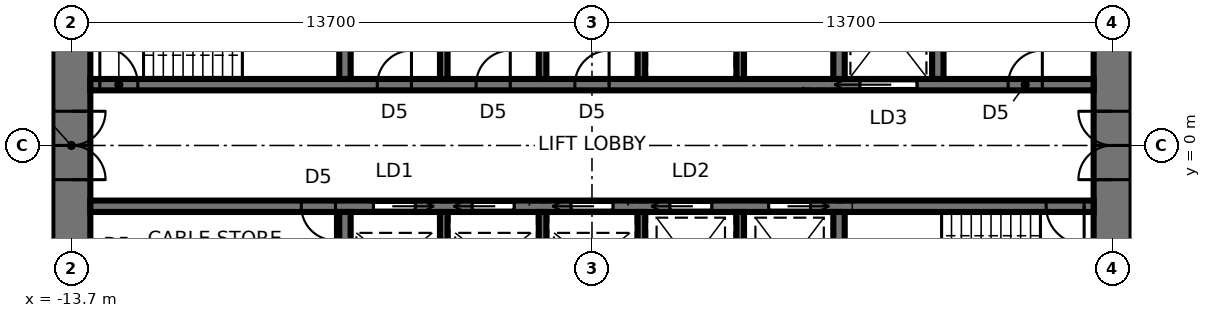
"""IFC4 building model, lengths in metres.
Left out: names, types, materials, properties, quantities, classifications, styles, units other than length and angle.
Written with IfcOpenShell. Run it as: python <this file> out.ifc"""

import sys

from ifc_helpers import new_model, si_unit, direction, frame, frame_2d, origin, place, context, subcontext, project, spatial, rectangle, extrude, element, fill, save


model = new_model("IFC4")
c1 = context("Model", 3, precision=1e-05, world=origin(), true_north=direction((0.0, 1.0)))
c2 = subcontext(c1, "Body", "Model", "MODEL_VIEW")
j1 = project(units=[si_unit("LENGTHUNIT", "METRE"), si_unit("PLANEANGLEUNIT", "RADIAN")], contexts=[c1])
p1 = place(None, origin())
s1 = spatial("IfcSite", under=j1, at=p1, CompositionType="ELEMENT")
p2 = place(p1, origin())
s2 = spatial("IfcBuilding", under=s1, at=p2, CompositionType="ELEMENT")
p3 = place(p2, frame((0.0, 0.0, 147.0)))
s3 = spatial("IfcBuildingStorey", under=s2, at=p3, CompositionType="ELEMENT", Elevation=147.0)
p4 = place(p3, frame((13.7, -9.5, 0.0), z_axis=(0.0, 0.0, 1.0), x_axis=(0.0, 1.0, 0.0)))
e1 = element("IfcWall", 1, at=p4, inside=s3, PredefinedType="SHEAR", context=c2, shape_type="SweptSolid", body=[
    extrude(rectangle(XDim=19.0, YDim=1.0, at=frame_2d((9.5, 0.0))), origin(), (0.0, 0.0, 1.0), 3.9),
])
p5 = place(p4, frame((8.6, 0.0, 0.0)))
e2 = element("IfcOpeningElement", 2, at=p5, cuts=e1, PredefinedType="OPENING", context=c2, shape_type="SweptSolid", body=[
    extrude(rectangle(XDim=1.8, YDim=2.4, at=frame_2d((0.9, 1.2))), frame((0.0, 0.51, 0.0), z_axis=(0.0, -1.0, 0.0), x_axis=(1.0, 0.0, 0.0)), (0.0, 0.0, 1.0), 1.02),
])
p6 = place(p3, frame((-13.7, 9.5, 0.0), z_axis=(0.0, 0.0, 1.0), x_axis=(0.0, -1.0, 0.0)))
e3 = element("IfcWall", 3, at=p6, inside=s3, PredefinedType="SHEAR", context=c2, shape_type="SweptSolid", body=[
    extrude(rectangle(XDim=19.0, YDim=1.0, at=frame_2d((9.5, 0.0))), origin(), (0.0, 0.0, 1.0), 3.9),
])
p7 = place(p6, frame((8.6, 0.0, 0.0)))
e4 = element("IfcOpeningElement", 4, at=p7, cuts=e3, PredefinedType="OPENING", context=c2, shape_type="SweptSolid", body=[
    extrude(rectangle(XDim=1.8, YDim=2.4, at=frame_2d((0.9, 1.2))), frame((0.0, 0.51, 0.0), z_axis=(0.0, -1.0, 0.0), x_axis=(1.0, 0.0, 0.0)), (0.0, 0.0, 1.0), 1.02),
])
p8 = place(p3, frame((-13.2, 1.6, 0.0), z_axis=(0.0, 0.0, 1.0), x_axis=(1.0, 0.0, 0.0)))
e5 = element("IfcWall", 5, at=p8, inside=s3, PredefinedType="SHEAR", context=c2, shape_type="SweptSolid", body=[
    extrude(rectangle(XDim=26.4, YDim=0.3, at=frame_2d((13.2, 0.0))), origin(), (0.0, 0.0, 1.0), 3.9),
])
p9 = place(p8, frame((0.25, 0.0, 0.0)))
e6 = element("IfcOpeningElement", 6, at=p9, cuts=e5, PredefinedType="OPENING", context=c2, shape_type="SweptSolid", body=[
    extrude(rectangle(XDim=1.0, YDim=2.1, at=frame_2d((0.5, 1.05))), frame((0.0, 0.16, 0.0), z_axis=(0.0, -1.0, 0.0), x_axis=(1.0, 0.0, 0.0)), (0.0, 0.0, 1.0), 0.32),
])
p10 = place(p8, frame((20.25, 0.0, 0.0)))
e7 = element("IfcOpeningElement", 7, at=p10, cuts=e5, PredefinedType="OPENING", context=c2, shape_type="SweptSolid", body=[
    extrude(rectangle(XDim=1.5, YDim=2.4, at=frame_2d((0.75, 1.2))), frame((0.0, 0.16, 0.0), z_axis=(0.0, -1.0, 0.0), x_axis=(1.0, 0.0, 0.0)), (0.0, 0.0, 1.0), 0.32),
])
p11 = place(p8, frame((7.55, 0.0, 0.0)))
e8 = element("IfcOpeningElement", 8, at=p11, cuts=e5, PredefinedType="OPENING", context=c2, shape_type="SweptSolid", body=[
    extrude(rectangle(XDim=0.9, YDim=2.1, at=frame_2d((0.45, 1.05))), frame((0.0, 0.16, 0.0), z_axis=(0.0, -1.0, 0.0), x_axis=(1.0, 0.0, 0.0)), (0.0, 0.0, 1.0), 0.32),
])
p12 = place(p8, frame((10.15, 0.0, 0.0)))
e9 = element("IfcOpeningElement", 9, at=p12, cuts=e5, PredefinedType="OPENING", context=c2, shape_type="SweptSolid", body=[
    extrude(rectangle(XDim=0.9, YDim=2.1, at=frame_2d((0.45, 1.05))), frame((0.0, 0.16, 0.0), z_axis=(0.0, -1.0, 0.0), x_axis=(1.0, 0.0, 0.0)), (0.0, 0.0, 1.0), 0.32),
])
p13 = place(p8, frame((12.75, 0.0, 0.0)))
e10 = element("IfcOpeningElement", 10, at=p13, cuts=e5, PredefinedType="OPENING", context=c2, shape_type="SweptSolid", body=[
    extrude(rectangle(XDim=0.9, YDim=2.1, at=frame_2d((0.45, 1.05))), frame((0.0, 0.16, 0.0), z_axis=(0.0, -1.0, 0.0), x_axis=(1.0, 0.0, 0.0)), (0.0, 0.0, 1.0), 0.32),
])
p14 = place(p8, frame((24.15, 0.0, 0.0)))
e11 = element("IfcOpeningElement", 11, at=p14, cuts=e5, PredefinedType="OPENING", context=c2, shape_type="SweptSolid", body=[
    extrude(rectangle(XDim=0.9, YDim=2.1, at=frame_2d((0.45, 1.05))), frame((0.0, 0.16, 0.0), z_axis=(0.0, -1.0, 0.0), x_axis=(1.0, 0.0, 0.0)), (0.0, 0.0, 1.0), 0.32),
])
p15 = place(p3, frame((-13.2, -1.6, 0.0), z_axis=(0.0, 0.0, 1.0), x_axis=(1.0, 0.0, 0.0)))
e12 = element("IfcWall", 12, at=p15, inside=s3, PredefinedType="SHEAR", context=c2, shape_type="SweptSolid", body=[
    extrude(rectangle(XDim=26.4, YDim=0.3, at=frame_2d((13.2, 0.0))), origin(), (0.0, 0.0, 1.0), 3.9),
])
p16 = place(p15, frame((25.15, 0.0, 0.0)))
e13 = element("IfcOpeningElement", 13, at=p16, cuts=e12, PredefinedType="OPENING", context=c2, shape_type="SweptSolid", body=[
    extrude(rectangle(XDim=1.0, YDim=2.1, at=frame_2d((0.5, 1.05))), frame((0.0, 0.16, 0.0), z_axis=(0.0, -1.0, 0.0), x_axis=(1.0, 0.0, 0.0)), (0.0, 0.0, 1.0), 0.32),
])
p17 = place(p15, frame((7.45, 0.0, 0.0)))
e14 = element("IfcOpeningElement", 14, at=p17, cuts=e12, PredefinedType="OPENING", context=c2, shape_type="SweptSolid", body=[
    extrude(rectangle(XDim=1.1, YDim=2.3, at=frame_2d((0.55, 1.15))), frame((0.0, 0.16, 0.0), z_axis=(0.0, -1.0, 0.0), x_axis=(1.0, 0.0, 0.0)), (0.0, 0.0, 1.0), 0.32),
])
p18 = place(p15, frame((10.05, 0.0, 0.0)))
e15 = element("IfcOpeningElement", 15, at=p18, cuts=e12, PredefinedType="OPENING", context=c2, shape_type="SweptSolid", body=[
    extrude(rectangle(XDim=1.1, YDim=2.3, at=frame_2d((0.55, 1.15))), frame((0.0, 0.16, 0.0), z_axis=(0.0, -1.0, 0.0), x_axis=(1.0, 0.0, 0.0)), (0.0, 0.0, 1.0), 0.32),
])
p19 = place(p15, frame((12.65, 0.0, 0.0)))
e16 = element("IfcOpeningElement", 16, at=p19, cuts=e12, PredefinedType="OPENING", context=c2, shape_type="SweptSolid", body=[
    extrude(rectangle(XDim=1.1, YDim=2.3, at=frame_2d((0.55, 1.15))), frame((0.0, 0.16, 0.0), z_axis=(0.0, -1.0, 0.0), x_axis=(1.0, 0.0, 0.0)), (0.0, 0.0, 1.0), 0.32),
])
p20 = place(p15, frame((15.25, 0.0, 0.0)))
e17 = element("IfcOpeningElement", 17, at=p20, cuts=e12, PredefinedType="OPENING", context=c2, shape_type="SweptSolid", body=[
    extrude(rectangle(XDim=1.1, YDim=2.3, at=frame_2d((0.55, 1.15))), frame((0.0, 0.16, 0.0), z_axis=(0.0, -1.0, 0.0), x_axis=(1.0, 0.0, 0.0)), (0.0, 0.0, 1.0), 0.32),
])
p21 = place(p15, frame((17.85, 0.0, 0.0)))
e18 = element("IfcOpeningElement", 18, at=p21, cuts=e12, PredefinedType="OPENING", context=c2, shape_type="SweptSolid", body=[
    extrude(rectangle(XDim=1.1, YDim=2.3, at=frame_2d((0.55, 1.15))), frame((0.0, 0.16, 0.0), z_axis=(0.0, -1.0, 0.0), x_axis=(1.0, 0.0, 0.0)), (0.0, 0.0, 1.0), 0.32),
])
p22 = place(p15, frame((5.55, 0.0, 0.0)))
e19 = element("IfcOpeningElement", 19, at=p22, cuts=e12, PredefinedType="OPENING", context=c2, shape_type="SweptSolid", body=[
    extrude(rectangle(XDim=0.9, YDim=2.1, at=frame_2d((0.45, 1.05))), frame((0.0, 0.16, 0.0), z_axis=(0.0, -1.0, 0.0), x_axis=(1.0, 0.0, 0.0)), (0.0, 0.0, 1.0), 0.32),
])
for number, where, z_axis, x_axis in (
    (20, (-6.5, 1.75, 0.0), (0.0, 0.0, 1.0), (0.0, 1.0, 0.0)),
    (21, (6.5, 1.75, 0.0), (0.0, 0.0, 1.0), (0.0, 1.0, 0.0)),
):
    element("IfcWall", number, at=place(p3, frame(where, z_axis=z_axis, x_axis=x_axis)), inside=s3, PredefinedType="SHEAR", context=c2, shape_type="SweptSolid", body=[
        extrude(rectangle(XDim=2.7, YDim=0.3, at=frame_2d((1.35, 0.0))), origin(), (0.0, 0.0, 1.0), 3.9),
    ])
for number, where, z_axis, x_axis in (
    (22, (-3.9, 1.75, 0.0), (0.0, 0.0, 1.0), (0.0, 1.0, 0.0)),
    (23, (-1.3, 1.75, 0.0), (0.0, 0.0, 1.0), (0.0, 1.0, 0.0)),
    (24, (1.3, 1.75, 0.0), (0.0, 0.0, 1.0), (0.0, 1.0, 0.0)),
    (25, (3.9, 1.75, 0.0), (0.0, 0.0, 1.0), (0.0, 1.0, 0.0)),
):
    element("IfcWall", number, at=place(p3, frame(where, z_axis=z_axis, x_axis=x_axis)), inside=s3, PredefinedType="SHEAR", context=c2, shape_type="SweptSolid", body=[
        extrude(rectangle(XDim=2.7, YDim=0.2, at=frame_2d((1.35, 0.0))), origin(), (0.0, 0.0, 1.0), 3.9),
    ])
for number, where, z_axis, x_axis in (
    (26, (-6.5, -1.75, 0.0), (0.0, 0.0, 1.0), (0.0, -1.0, 0.0)),
    (27, (6.5, -1.75, 0.0), (0.0, 0.0, 1.0), (0.0, -1.0, 0.0)),
):
    element("IfcWall", number, at=place(p3, frame(where, z_axis=z_axis, x_axis=x_axis)), inside=s3, PredefinedType="SHEAR", context=c2, shape_type="SweptSolid", body=[
        extrude(rectangle(XDim=2.7, YDim=0.3, at=frame_2d((1.35, 0.0))), origin(), (0.0, 0.0, 1.0), 3.9),
    ])
for number, where, z_axis, x_axis in (
    (28, (-3.9, -1.75, 0.0), (0.0, 0.0, 1.0), (0.0, -1.0, 0.0)),
    (29, (-1.3, -1.75, 0.0), (0.0, 0.0, 1.0), (0.0, -1.0, 0.0)),
    (30, (1.3, -1.75, 0.0), (0.0, 0.0, 1.0), (0.0, -1.0, 0.0)),
    (31, (3.9, -1.75, 0.0), (0.0, 0.0, 1.0), (0.0, -1.0, 0.0)),
):
    element("IfcWall", number, at=place(p3, frame(where, z_axis=z_axis, x_axis=x_axis)), inside=s3, PredefinedType="SHEAR", context=c2, shape_type="SweptSolid", body=[
        extrude(rectangle(XDim=2.7, YDim=0.2, at=frame_2d((1.35, 0.0))), origin(), (0.0, 0.0, 1.0), 3.9),
    ])
p23 = place(p3, frame((9.1, 1.75, 0.0), z_axis=(0.0, 0.0, 1.0), x_axis=(0.0, 1.0, 0.0)))
e32 = element("IfcWall", 32, at=p23, inside=s3, PredefinedType="SHEAR", context=c2, shape_type="SweptSolid", body=[
    extrude(rectangle(XDim=2.7, YDim=0.3, at=frame_2d((1.35, 0.0))), origin(), (0.0, 0.0, 1.0), 3.9),
])
p24 = place(p7, origin())
e33 = element("IfcDoor", 33, at=p24, inside=s3, OperationType="DOUBLE_DOOR_SINGLE_SWING", PredefinedType="DOOR", context=c2, shape_type="SweptSolid", body=[
    extrude(rectangle(XDim=1.72, YDim=2.36, at=frame_2d((0.9, 1.18))), frame((0.0, 0.025, 0.0), z_axis=(0.0, -1.0, 0.0), x_axis=(1.0, 0.0, 0.0)), (0.0, 0.0, 1.0), 0.05),
    extrude(rectangle(XDim=0.04, YDim=2.4, at=frame_2d((0.02, 1.2))), frame((0.0, 0.25, 0.0), z_axis=(0.0, -1.0, 0.0), x_axis=(1.0, 0.0, 0.0)), (0.0, 0.0, 1.0), 0.5),
    extrude(rectangle(XDim=0.04, YDim=2.4, at=frame_2d((1.78, 1.2))), frame((0.0, 0.25, 0.0), z_axis=(0.0, -1.0, 0.0), x_axis=(1.0, 0.0, 0.0)), (0.0, 0.0, 1.0), 0.5),
    extrude(rectangle(XDim=1.72, YDim=0.04, at=frame_2d((0.9, 2.38))), frame((0.0, 0.25, 0.0), z_axis=(0.0, -1.0, 0.0), x_axis=(1.0, 0.0, 0.0)), (0.0, 0.0, 1.0), 0.5),
])
fill(e4, e33)
p25 = place(p5, origin())
e34 = element("IfcDoor", 34, at=p25, inside=s3, OperationType="DOUBLE_DOOR_SINGLE_SWING", PredefinedType="DOOR", context=c2, shape_type="SweptSolid", body=[
    extrude(rectangle(XDim=1.72, YDim=2.36, at=frame_2d((0.9, 1.18))), frame((0.0, 0.025, 0.0), z_axis=(0.0, -1.0, 0.0), x_axis=(1.0, 0.0, 0.0)), (0.0, 0.0, 1.0), 0.05),
    extrude(rectangle(XDim=0.04, YDim=2.4, at=frame_2d((0.02, 1.2))), frame((0.0, 0.25, 0.0), z_axis=(0.0, -1.0, 0.0), x_axis=(1.0, 0.0, 0.0)), (0.0, 0.0, 1.0), 0.5),
    extrude(rectangle(XDim=0.04, YDim=2.4, at=frame_2d((1.78, 1.2))), frame((0.0, 0.25, 0.0), z_axis=(0.0, -1.0, 0.0), x_axis=(1.0, 0.0, 0.0)), (0.0, 0.0, 1.0), 0.5),
    extrude(rectangle(XDim=1.72, YDim=0.04, at=frame_2d((0.9, 2.38))), frame((0.0, 0.25, 0.0), z_axis=(0.0, -1.0, 0.0), x_axis=(1.0, 0.0, 0.0)), (0.0, 0.0, 1.0), 0.5),
])
fill(e2, e34)
p26 = place(p9, origin())
e35 = element("IfcDoor", 35, at=p26, inside=s3, OperationType="SINGLE_SWING_LEFT", PredefinedType="DOOR", context=c2, shape_type="SweptSolid", body=[
    extrude(rectangle(XDim=1.0, YDim=2.1, at=frame_2d((0.5, 1.05))), frame((0.0, 0.025, 0.0), z_axis=(0.0, -1.0, 0.0), x_axis=(1.0, 0.0, 0.0)), (0.0, 0.0, 1.0), 0.05),
])
fill(e6, e35)
p27 = place(p16, frame((1.0, 0.0, 0.0), z_axis=(0.0, 0.0, 1.0), x_axis=(-1.0, 0.0, 0.0)))
e36 = element("IfcDoor", 36, at=p27, inside=s3, OperationType="SINGLE_SWING_LEFT", PredefinedType="DOOR", context=c2, shape_type="SweptSolid", body=[
    extrude(rectangle(XDim=1.0, YDim=2.1, at=frame_2d((0.5, 1.05))), frame((0.0, 0.025, 0.0), z_axis=(0.0, -1.0, 0.0), x_axis=(1.0, 0.0, 0.0)), (0.0, 0.0, 1.0), 0.05),
])
fill(e13, e36)
p28 = place(p10, origin())
e37 = element("IfcDoor", 37, at=p28, inside=s3, OperationType="SLIDING_TO_LEFT", PredefinedType="DOOR", context=c2, shape_type="SweptSolid", body=[
    extrude(rectangle(XDim=1.5, YDim=2.4, at=frame_2d((0.75, 1.2))), frame((0.0, 0.025, 0.0), z_axis=(0.0, -1.0, 0.0), x_axis=(1.0, 0.0, 0.0)), (0.0, 0.0, 1.0), 0.05),
])
fill(e7, e37)
p29 = place(p11, origin())
e38 = element("IfcDoor", 38, at=p29, inside=s3, OperationType="SINGLE_SWING_RIGHT", PredefinedType="DOOR", context=c2, shape_type="SweptSolid", body=[
    extrude(rectangle(XDim=0.9, YDim=2.1, at=frame_2d((0.45, 1.05))), frame((0.0, 0.025, 0.0), z_axis=(0.0, -1.0, 0.0), x_axis=(1.0, 0.0, 0.0)), (0.0, 0.0, 1.0), 0.05),
])
fill(e8, e38)
p30 = place(p12, origin())
e39 = element("IfcDoor", 39, at=p30, inside=s3, OperationType="SINGLE_SWING_RIGHT", PredefinedType="DOOR", context=c2, shape_type="SweptSolid", body=[
    extrude(rectangle(XDim=0.9, YDim=2.1, at=frame_2d((0.45, 1.05))), frame((0.0, 0.025, 0.0), z_axis=(0.0, -1.0, 0.0), x_axis=(1.0, 0.0, 0.0)), (0.0, 0.0, 1.0), 0.05),
])
fill(e9, e39)
p31 = place(p13, origin())
e40 = element("IfcDoor", 40, at=p31, inside=s3, OperationType="SINGLE_SWING_RIGHT", PredefinedType="DOOR", context=c2, shape_type="SweptSolid", body=[
    extrude(rectangle(XDim=0.9, YDim=2.1, at=frame_2d((0.45, 1.05))), frame((0.0, 0.025, 0.0), z_axis=(0.0, -1.0, 0.0), x_axis=(1.0, 0.0, 0.0)), (0.0, 0.0, 1.0), 0.05),
])
fill(e10, e40)
p32 = place(p17, frame((1.1, 0.0, 0.0), z_axis=(0.0, 0.0, 1.0), x_axis=(-1.0, 0.0, 0.0)))
e41 = element("IfcDoor", 41, at=p32, inside=s3, OperationType="SLIDING_TO_LEFT", PredefinedType="DOOR", context=c2, shape_type="SweptSolid", body=[
    extrude(rectangle(XDim=1.1, YDim=2.3, at=frame_2d((0.55, 1.15))), frame((0.0, 0.025, 0.0), z_axis=(0.0, -1.0, 0.0), x_axis=(1.0, 0.0, 0.0)), (0.0, 0.0, 1.0), 0.05),
])
fill(e14, e41)
p33 = place(p18, frame((1.1, 0.0, 0.0), z_axis=(0.0, 0.0, 1.0), x_axis=(-1.0, 0.0, 0.0)))
e42 = element("IfcDoor", 42, at=p33, inside=s3, OperationType="SLIDING_TO_RIGHT", PredefinedType="DOOR", context=c2, shape_type="SweptSolid", body=[
    extrude(rectangle(XDim=1.1, YDim=2.3, at=frame_2d((0.55, 1.15))), frame((0.0, 0.025, 0.0), z_axis=(0.0, -1.0, 0.0), x_axis=(1.0, 0.0, 0.0)), (0.0, 0.0, 1.0), 0.05),
])
fill(e15, e42)
p34 = place(p19, frame((1.1, 0.0, 0.0), z_axis=(0.0, 0.0, 1.0), x_axis=(-1.0, 0.0, 0.0)))
e43 = element("IfcDoor", 43, at=p34, inside=s3, OperationType="SLIDING_TO_RIGHT", PredefinedType="DOOR", context=c2, shape_type="SweptSolid", body=[
    extrude(rectangle(XDim=1.1, YDim=2.3, at=frame_2d((0.55, 1.15))), frame((0.0, 0.025, 0.0), z_axis=(0.0, -1.0, 0.0), x_axis=(1.0, 0.0, 0.0)), (0.0, 0.0, 1.0), 0.05),
])
fill(e16, e43)
p35 = place(p20, frame((1.1, 0.0, 0.0), z_axis=(0.0, 0.0, 1.0), x_axis=(-1.0, 0.0, 0.0)))
e44 = element("IfcDoor", 44, at=p35, inside=s3, OperationType="SLIDING_TO_RIGHT", PredefinedType="DOOR", context=c2, shape_type="SweptSolid", body=[
    extrude(rectangle(XDim=1.1, YDim=2.3, at=frame_2d((0.55, 1.15))), frame((0.0, 0.025, 0.0), z_axis=(0.0, -1.0, 0.0), x_axis=(1.0, 0.0, 0.0)), (0.0, 0.0, 1.0), 0.05),
])
fill(e17, e44)
p36 = place(p21, frame((1.1, 0.0, 0.0), z_axis=(0.0, 0.0, 1.0), x_axis=(-1.0, 0.0, 0.0)))
e45 = element("IfcDoor", 45, at=p36, inside=s3, OperationType="SLIDING_TO_LEFT", PredefinedType="DOOR", context=c2, shape_type="SweptSolid", body=[
    extrude(rectangle(XDim=1.1, YDim=2.3, at=frame_2d((0.55, 1.15))), frame((0.0, 0.025, 0.0), z_axis=(0.0, -1.0, 0.0), x_axis=(1.0, 0.0, 0.0)), (0.0, 0.0, 1.0), 0.05),
])
fill(e18, e45)
p37 = place(p14, origin())
e46 = element("IfcDoor", 46, at=p37, inside=s3, OperationType="SINGLE_SWING_RIGHT", PredefinedType="DOOR", context=c2, shape_type="SweptSolid", body=[
    extrude(rectangle(XDim=0.9, YDim=2.1, at=frame_2d((0.45, 1.05))), frame((0.0, 0.025, 0.0), z_axis=(0.0, -1.0, 0.0), x_axis=(1.0, 0.0, 0.0)), (0.0, 0.0, 1.0), 0.05),
])
fill(e11, e46)
p38 = place(p22, frame((0.9, 0.0, 0.0), z_axis=(0.0, 0.0, 1.0), x_axis=(-1.0, 0.0, 0.0)))
e47 = element("IfcDoor", 47, at=p38, inside=s3, OperationType="SINGLE_SWING_LEFT", PredefinedType="DOOR", context=c2, shape_type="SweptSolid", body=[
    extrude(rectangle(XDim=0.9, YDim=2.1, at=frame_2d((0.45, 1.05))), frame((0.0, 0.025, 0.0), z_axis=(0.0, -1.0, 0.0), x_axis=(1.0, 0.0, 0.0)), (0.0, 0.0, 1.0), 0.05),
])
fill(e19, e47)
save(model, sys.argv[1])
